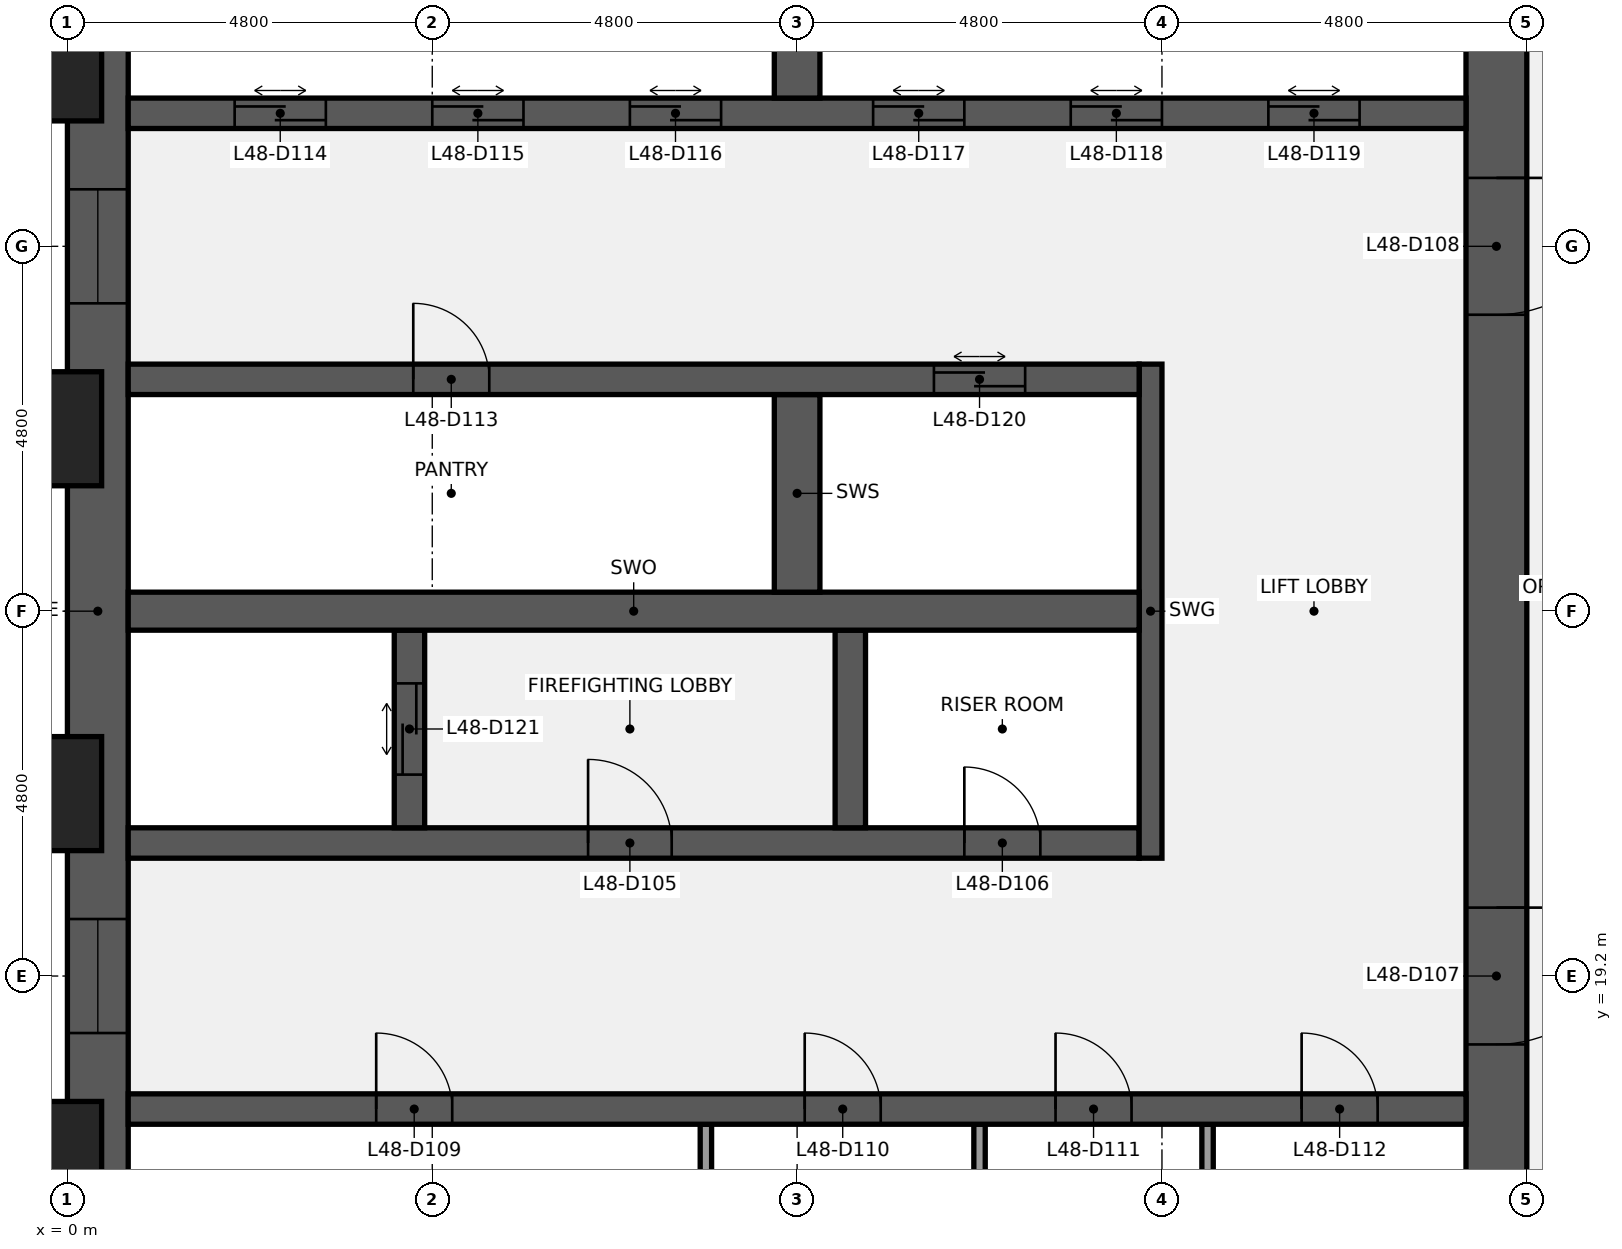
"""IFC4 building model, lengths in metres.
Left out: names, types, materials, properties, quantities, classifications, styles, units other than length and angle.
Written with IfcOpenShell. Run it as: python <this file> out.ifc"""

import sys

from ifc_helpers import new_model, si_unit, direction, frame, frame_2d, origin, origin_2d, place, context, subcontext, project, spatial, rectangle, extrude, element, fill, save


model = new_model("IFC4")
c1 = context("Model", 3, precision=1e-05, world=origin(), true_north=direction((0.0, 1.0)))
c2 = subcontext(c1, "Body", "Model", "MODEL_VIEW")
j1 = project(units=[si_unit("LENGTHUNIT", "METRE"), si_unit("PLANEANGLEUNIT", "RADIAN")], contexts=[c1])
p1 = place(None, origin())
s1 = spatial("IfcSite", under=j1, at=p1, CompositionType="ELEMENT")
p2 = place(p1, origin())
s2 = spatial("IfcBuilding", under=s1, at=p2, CompositionType="ELEMENT")
p3 = place(p2, frame((0.0, 0.0, 221.2)))
s3 = spatial("IfcBuildingStorey", under=s2, at=p3, CompositionType="ELEMENT", Elevation=221.2)
p4 = place(p3, frame((0.4, 9.6, 0.0), z_axis=(0.0, 0.0, 1.0), x_axis=(0.0, 1.0, 0.0)))
e1 = element("IfcWall", 1, at=p4, inside=s3, PredefinedType="SHEAR", context=c2, shape_type="SweptSolid", body=[
    extrude(rectangle(XDim=28.8, YDim=0.8, at=frame_2d((14.4, 0.0))), origin(), (0.0, 0.0, 1.0), 3.84),
])
p5 = place(p4, frame((8.85, 0.0, 0.9)))
e2 = element("IfcOpeningElement", 2, at=p5, cuts=e1, PredefinedType="OPENING", context=c2, shape_type="SweptSolid", body=[
    extrude(rectangle(XDim=1.5, YDim=1.5, at=frame_2d((0.75, 0.75))), frame((0.0, 0.41, 0.0), z_axis=(0.0, -1.0, 0.0), x_axis=(1.0, 0.0, 0.0)), (0.0, 0.0, 1.0), 0.82),
])
p6 = place(p4, frame((18.45, 0.0, 0.9)))
e3 = element("IfcOpeningElement", 3, at=p6, cuts=e1, PredefinedType="OPENING", context=c2, shape_type="SweptSolid", body=[
    extrude(rectangle(XDim=1.5, YDim=1.5, at=frame_2d((0.75, 0.75))), frame((0.0, 0.41, 0.0), z_axis=(0.0, -1.0, 0.0), x_axis=(1.0, 0.0, 0.0)), (0.0, 0.0, 1.0), 0.82),
])
p7 = place(p3, frame((18.8, 38.4, 0.0), z_axis=(0.0, 0.0, 1.0), x_axis=(0.0, -1.0, 0.0)))
e4 = element("IfcWall", 4, at=p7, inside=s3, PredefinedType="SHEAR", context=c2, shape_type="SweptSolid", body=[
    extrude(rectangle(XDim=28.8, YDim=0.8, at=frame_2d((14.4, 0.0))), origin(), (0.0, 0.0, 1.0), 3.84),
])
p8 = place(p7, frame((18.3, 0.0, 0.0)))
e5 = element("IfcOpeningElement", 5, at=p8, cuts=e4, PredefinedType="OPENING", context=c2, shape_type="SweptSolid", body=[
    extrude(rectangle(XDim=1.8, YDim=2.1, at=frame_2d((0.9, 1.05))), frame((0.0, 0.41, 0.0), z_axis=(0.0, -1.0, 0.0), x_axis=(1.0, 0.0, 0.0)), (0.0, 0.0, 1.0), 0.82),
])
p9 = place(p7, frame((8.7, 0.0, 0.0)))
e6 = element("IfcOpeningElement", 6, at=p9, cuts=e4, PredefinedType="OPENING", context=c2, shape_type="SweptSolid", body=[
    extrude(rectangle(XDim=1.8, YDim=2.1, at=frame_2d((0.9, 1.05))), frame((0.0, 0.41, 0.0), z_axis=(0.0, -1.0, 0.0), x_axis=(1.0, 0.0, 0.0)), (0.0, 0.0, 1.0), 0.82),
])
for number, where, z_axis, x_axis in (
    (7, (8.4, 14.65, 0.0), (0.0, 0.0, 1.0), (0.0, 1.0, 0.0)),
    (8, (12.0, 14.65, 0.0), (0.0, 0.0, 1.0), (0.0, 1.0, 0.0)),
    (9, (15.0, 14.65, 0.0), (0.0, 0.0, 1.0), (0.0, 1.0, 0.0)),
):
    element("IfcWall", number, at=place(p3, frame(where, z_axis=z_axis, x_axis=x_axis)), inside=s3, PredefinedType="PARTITIONING", context=c2, shape_type="SweptSolid", body=[
        extrude(rectangle(XDim=2.6, YDim=0.15, at=frame_2d((1.3, 0.0))), origin(), (0.0, 0.0, 1.0), 3.84),
    ])
p10 = place(p3, frame((0.8, 17.45, 0.0), z_axis=(0.0, 0.0, 1.0), x_axis=(1.0, 0.0, 0.0)))
e10 = element("IfcWall", 10, at=p10, inside=s3, PredefinedType="SHEAR", context=c2, shape_type="SweptSolid", body=[
    extrude(rectangle(XDim=17.6, YDim=0.4, at=frame_2d((8.8, 0.0))), origin(), (0.0, 0.0, 1.0), 3.84),
])
p11 = place(p10, frame((3.262, 0.0, 0.0)))
e11 = element("IfcOpeningElement", 11, at=p11, cuts=e10, PredefinedType="OPENING", context=c2, shape_type="SweptSolid", body=[
    extrude(rectangle(XDim=1.0, YDim=2.1, at=frame_2d((0.5, 1.05))), frame((0.0, 0.21, 0.0), z_axis=(0.0, -1.0, 0.0), x_axis=(1.0, 0.0, 0.0)), (0.0, 0.0, 1.0), 0.42),
])
p12 = place(p10, frame((8.9, 0.0, 0.0)))
e12 = element("IfcOpeningElement", 12, at=p12, cuts=e10, PredefinedType="OPENING", context=c2, shape_type="SweptSolid", body=[
    extrude(rectangle(XDim=1.0, YDim=2.1, at=frame_2d((0.5, 1.05))), frame((0.0, 0.21, 0.0), z_axis=(0.0, -1.0, 0.0), x_axis=(1.0, 0.0, 0.0)), (0.0, 0.0, 1.0), 0.42),
])
p13 = place(p10, frame((12.2, 0.0, 0.0)))
e13 = element("IfcOpeningElement", 13, at=p13, cuts=e10, PredefinedType="OPENING", context=c2, shape_type="SweptSolid", body=[
    extrude(rectangle(XDim=1.0, YDim=2.1, at=frame_2d((0.5, 1.05))), frame((0.0, 0.21, 0.0), z_axis=(0.0, -1.0, 0.0), x_axis=(1.0, 0.0, 0.0)), (0.0, 0.0, 1.0), 0.42),
])
p14 = place(p10, frame((15.438, 0.0, 0.0)))
e14 = element("IfcOpeningElement", 14, at=p14, cuts=e10, PredefinedType="OPENING", context=c2, shape_type="SweptSolid", body=[
    extrude(rectangle(XDim=1.0, YDim=2.1, at=frame_2d((0.5, 1.05))), frame((0.0, 0.21, 0.0), z_axis=(0.0, -1.0, 0.0), x_axis=(1.0, 0.0, 0.0)), (0.0, 0.0, 1.0), 0.42),
])
p15 = place(p3, frame((0.8, 20.95, 0.0), z_axis=(0.0, 0.0, 1.0), x_axis=(1.0, 0.0, 0.0)))
e15 = element("IfcWall", 15, at=p15, inside=s3, PredefinedType="SHEAR", context=c2, shape_type="SweptSolid", body=[
    extrude(rectangle(XDim=13.3, YDim=0.4, at=frame_2d((6.65, 0.0))), origin(), (0.0, 0.0, 1.0), 3.84),
])
p16 = place(p15, frame((6.05, 0.0, 0.0)))
e16 = element("IfcOpeningElement", 16, at=p16, cuts=e15, PredefinedType="OPENING", context=c2, shape_type="SweptSolid", body=[
    extrude(rectangle(XDim=1.1, YDim=2.1, at=frame_2d((0.55, 1.05))), frame((0.0, 0.21, 0.0), z_axis=(0.0, -1.0, 0.0), x_axis=(1.0, 0.0, 0.0)), (0.0, 0.0, 1.0), 0.42),
])
p17 = place(p15, frame((11.0, 0.0, 0.0)))
e17 = element("IfcOpeningElement", 17, at=p17, cuts=e15, PredefinedType="OPENING", context=c2, shape_type="SweptSolid", body=[
    extrude(rectangle(XDim=1.0, YDim=2.1, at=frame_2d((0.5, 1.05))), frame((0.0, 0.21, 0.0), z_axis=(0.0, -1.0, 0.0), x_axis=(1.0, 0.0, 0.0)), (0.0, 0.0, 1.0), 0.42),
])
p18 = place(p3, frame((14.25, 20.75, 0.0), z_axis=(0.0, 0.0, 1.0), x_axis=(0.0, 1.0, 0.0)))
e18 = element("IfcWall", 18, at=p18, inside=s3, PredefinedType="SHEAR", context=c2, shape_type="SweptSolid", body=[
    extrude(rectangle(XDim=6.5, YDim=0.3, at=frame_2d((3.25, 0.0))), origin(), (0.0, 0.0, 1.0), 3.84),
])
p19 = place(p3, frame((4.5, 21.15, 0.0), z_axis=(0.0, 0.0, 1.0), x_axis=(0.0, 1.0, 0.0)))
e19 = element("IfcWall", 19, at=p19, inside=s3, PredefinedType="SHEAR", context=c2, shape_type="SweptSolid", body=[
    extrude(rectangle(XDim=2.6, YDim=0.4, at=frame_2d((1.3, 0.0))), origin(), (0.0, 0.0, 1.0), 3.84),
])
p20 = place(p19, frame((0.7, 0.0, 0.0)))
e20 = element("IfcOpeningElement", 20, at=p20, cuts=e19, PredefinedType="OPENING", context=c2, shape_type="SweptSolid", body=[
    extrude(rectangle(XDim=1.2, YDim=2.1, at=frame_2d((0.6, 1.05))), frame((0.0, 0.21, 0.0), z_axis=(0.0, -1.0, 0.0), x_axis=(1.0, 0.0, 0.0)), (0.0, 0.0, 1.0), 0.42),
])
p21 = place(p3, frame((10.3, 21.15, 0.0), z_axis=(0.0, 0.0, 1.0), x_axis=(0.0, 1.0, 0.0)))
e21 = element("IfcWall", 21, at=p21, inside=s3, PredefinedType="SHEAR", context=c2, shape_type="SweptSolid", body=[
    extrude(rectangle(XDim=2.6, YDim=0.4, at=frame_2d((1.3, 0.0))), origin(), (0.0, 0.0, 1.0), 3.84),
])
p22 = place(p3, frame((0.8, 24.0, 0.0), z_axis=(0.0, 0.0, 1.0), x_axis=(1.0, 0.0, 0.0)))
e22 = element("IfcWall", 22, at=p22, inside=s3, PredefinedType="SHEAR", context=c2, shape_type="SweptSolid", body=[
    extrude(rectangle(XDim=13.3, YDim=0.5, at=frame_2d((6.65, 0.0))), origin(), (0.0, 0.0, 1.0), 3.84),
])
p23 = place(p3, frame((9.6, 24.25, 0.0), z_axis=(0.0, 0.0, 1.0), x_axis=(0.0, 1.0, 0.0)))
e23 = element("IfcWall", 23, at=p23, inside=s3, PredefinedType="SHEAR", context=c2, shape_type="SweptSolid", body=[
    extrude(rectangle(XDim=2.6, YDim=0.6, at=frame_2d((1.3, 0.0))), origin(), (0.0, 0.0, 1.0), 3.84),
])
p24 = place(p3, frame((0.8, 27.05, 0.0), z_axis=(0.0, 0.0, 1.0), x_axis=(1.0, 0.0, 0.0)))
e24 = element("IfcWall", 24, at=p24, inside=s3, PredefinedType="SHEAR", context=c2, shape_type="SweptSolid", body=[
    extrude(rectangle(XDim=13.3, YDim=0.4, at=frame_2d((6.65, 0.0))), origin(), (0.0, 0.0, 1.0), 3.84),
])
p25 = place(p24, frame((3.75, 0.0, 0.0)))
e25 = element("IfcOpeningElement", 25, at=p25, cuts=e24, PredefinedType="OPENING", context=c2, shape_type="SweptSolid", body=[
    extrude(rectangle(XDim=1.0, YDim=2.1, at=frame_2d((0.5, 1.05))), frame((0.0, 0.21, 0.0), z_axis=(0.0, -1.0, 0.0), x_axis=(1.0, 0.0, 0.0)), (0.0, 0.0, 1.0), 0.42),
])
p26 = place(p24, frame((10.6, 0.0, 0.0)))
e26 = element("IfcOpeningElement", 26, at=p26, cuts=e24, PredefinedType="OPENING", context=c2, shape_type="SweptSolid", body=[
    extrude(rectangle(XDim=1.2, YDim=2.1, at=frame_2d((0.6, 1.05))), frame((0.0, 0.21, 0.0), z_axis=(0.0, -1.0, 0.0), x_axis=(1.0, 0.0, 0.0)), (0.0, 0.0, 1.0), 0.42),
])
p27 = place(p3, frame((0.8, 30.55, 0.0), z_axis=(0.0, 0.0, 1.0), x_axis=(1.0, 0.0, 0.0)))
e27 = element("IfcWall", 27, at=p27, inside=s3, PredefinedType="SHEAR", context=c2, shape_type="SweptSolid", body=[
    extrude(rectangle(XDim=17.6, YDim=0.4, at=frame_2d((8.8, 0.0))), origin(), (0.0, 0.0, 1.0), 3.84),
])
p28 = place(p27, frame((1.4, 0.0, 0.0)))
e28 = element("IfcOpeningElement", 28, at=p28, cuts=e27, PredefinedType="OPENING", context=c2, shape_type="SweptSolid", body=[
    extrude(rectangle(XDim=1.2, YDim=2.1, at=frame_2d((0.6, 1.05))), frame((0.0, 0.21, 0.0), z_axis=(0.0, -1.0, 0.0), x_axis=(1.0, 0.0, 0.0)), (0.0, 0.0, 1.0), 0.42),
])
p29 = place(p27, frame((4.0, 0.0, 0.0)))
e29 = element("IfcOpeningElement", 29, at=p29, cuts=e27, PredefinedType="OPENING", context=c2, shape_type="SweptSolid", body=[
    extrude(rectangle(XDim=1.2, YDim=2.1, at=frame_2d((0.6, 1.05))), frame((0.0, 0.21, 0.0), z_axis=(0.0, -1.0, 0.0), x_axis=(1.0, 0.0, 0.0)), (0.0, 0.0, 1.0), 0.42),
])
p30 = place(p27, frame((6.6, 0.0, 0.0)))
e30 = element("IfcOpeningElement", 30, at=p30, cuts=e27, PredefinedType="OPENING", context=c2, shape_type="SweptSolid", body=[
    extrude(rectangle(XDim=1.2, YDim=2.1, at=frame_2d((0.6, 1.05))), frame((0.0, 0.21, 0.0), z_axis=(0.0, -1.0, 0.0), x_axis=(1.0, 0.0, 0.0)), (0.0, 0.0, 1.0), 0.42),
])
p31 = place(p27, frame((9.8, 0.0, 0.0)))
e31 = element("IfcOpeningElement", 31, at=p31, cuts=e27, PredefinedType="OPENING", context=c2, shape_type="SweptSolid", body=[
    extrude(rectangle(XDim=1.2, YDim=2.1, at=frame_2d((0.6, 1.05))), frame((0.0, 0.21, 0.0), z_axis=(0.0, -1.0, 0.0), x_axis=(1.0, 0.0, 0.0)), (0.0, 0.0, 1.0), 0.42),
])
p32 = place(p27, frame((12.4, 0.0, 0.0)))
e32 = element("IfcOpeningElement", 32, at=p32, cuts=e27, PredefinedType="OPENING", context=c2, shape_type="SweptSolid", body=[
    extrude(rectangle(XDim=1.2, YDim=2.1, at=frame_2d((0.6, 1.05))), frame((0.0, 0.21, 0.0), z_axis=(0.0, -1.0, 0.0), x_axis=(1.0, 0.0, 0.0)), (0.0, 0.0, 1.0), 0.42),
])
p33 = place(p27, frame((15.0, 0.0, 0.0)))
e33 = element("IfcOpeningElement", 33, at=p33, cuts=e27, PredefinedType="OPENING", context=c2, shape_type="SweptSolid", body=[
    extrude(rectangle(XDim=1.2, YDim=2.1, at=frame_2d((0.6, 1.05))), frame((0.0, 0.21, 0.0), z_axis=(0.0, -1.0, 0.0), x_axis=(1.0, 0.0, 0.0)), (0.0, 0.0, 1.0), 0.42),
])
p34 = place(p3, frame((9.6, 30.75, 0.0), z_axis=(0.0, 0.0, 1.0), x_axis=(0.0, 1.0, 0.0)))
e34 = element("IfcWall", 34, at=p34, inside=s3, PredefinedType="SHEAR", context=c2, shape_type="SweptSolid", body=[
    extrude(rectangle(XDim=2.6, YDim=0.6, at=frame_2d((1.3, 0.0))), origin(), (0.0, 0.0, 1.0), 3.84),
])
for number, where, z_axis, x_axis in (
    (35, (-0.75, 16.8, 0.0), (0.0, 0.0, 1.0), (0.0, 1.0, 0.0)),
    (36, (-0.75, 21.6, 0.0), (0.0, 0.0, 1.0), (0.0, 1.0, 0.0)),
    (37, (-0.75, 26.4, 0.0), (0.0, 0.0, 1.0), (0.0, 1.0, 0.0)),
    (38, (-0.75, 31.2, 0.0), (0.0, 0.0, 1.0), (0.0, 1.0, 0.0)),
):
    element("IfcColumn", number, at=place(p3, frame(where, z_axis=z_axis, x_axis=x_axis)), inside=s3, PredefinedType="PILASTER", context=c2, shape_type="SweptSolid", body=[
        extrude(rectangle(XDim=2.4, YDim=1.5, at=origin_2d()), origin(), (0.0, 0.0, 1.0), 4.0),
    ])
p35 = place(p16, origin())
e39 = element("IfcDoor", 39, at=p35, inside=s3, OperationType="SINGLE_SWING_LEFT", PredefinedType="DOOR", context=c2, shape_type="SweptSolid", body=[
    extrude(rectangle(XDim=1.1, YDim=2.1, at=frame_2d((0.55, 1.05))), frame((0.0, 0.025, 0.0), z_axis=(0.0, -1.0, 0.0), x_axis=(1.0, 0.0, 0.0)), (0.0, 0.0, 1.0), 0.05),
])
fill(e16, e39)
p36 = place(p17, origin())
e40 = element("IfcDoor", 40, at=p36, inside=s3, OperationType="SINGLE_SWING_LEFT", PredefinedType="DOOR", context=c2, shape_type="SweptSolid", body=[
    extrude(rectangle(XDim=1.0, YDim=2.1, at=frame_2d((0.5, 1.05))), frame((0.0, 0.025, 0.0), z_axis=(0.0, -1.0, 0.0), x_axis=(1.0, 0.0, 0.0)), (0.0, 0.0, 1.0), 0.05),
])
fill(e17, e40)
p37 = place(p8, origin())
e41 = element("IfcDoor", 41, at=p37, inside=s3, OperationType="DOUBLE_DOOR_SINGLE_SWING", PredefinedType="DOOR", context=c2, shape_type="SweptSolid", body=[
    extrude(rectangle(XDim=1.8, YDim=2.1, at=frame_2d((0.9, 1.05))), frame((0.0, 0.025, 0.0), z_axis=(0.0, -1.0, 0.0), x_axis=(1.0, 0.0, 0.0)), (0.0, 0.0, 1.0), 0.05),
])
fill(e5, e41)
p38 = place(p9, origin())
e42 = element("IfcDoor", 42, at=p38, inside=s3, OperationType="DOUBLE_DOOR_SINGLE_SWING", PredefinedType="DOOR", context=c2, shape_type="SweptSolid", body=[
    extrude(rectangle(XDim=1.8, YDim=2.1, at=frame_2d((0.9, 1.05))), frame((0.0, 0.025, 0.0), z_axis=(0.0, -1.0, 0.0), x_axis=(1.0, 0.0, 0.0)), (0.0, 0.0, 1.0), 0.05),
])
fill(e6, e42)
p39 = place(p11, origin())
e43 = element("IfcDoor", 43, at=p39, inside=s3, OperationType="SINGLE_SWING_LEFT", PredefinedType="DOOR", context=c2, shape_type="SweptSolid", body=[
    extrude(rectangle(XDim=1.0, YDim=2.1, at=frame_2d((0.5, 1.05))), frame((0.0, 0.025, 0.0), z_axis=(0.0, -1.0, 0.0), x_axis=(1.0, 0.0, 0.0)), (0.0, 0.0, 1.0), 0.05),
])
fill(e11, e43)
p40 = place(p12, origin())
e44 = element("IfcDoor", 44, at=p40, inside=s3, OperationType="SINGLE_SWING_LEFT", PredefinedType="DOOR", context=c2, shape_type="SweptSolid", body=[
    extrude(rectangle(XDim=1.0, YDim=2.1, at=frame_2d((0.5, 1.05))), frame((0.0, 0.025, 0.0), z_axis=(0.0, -1.0, 0.0), x_axis=(1.0, 0.0, 0.0)), (0.0, 0.0, 1.0), 0.05),
])
fill(e12, e44)
p41 = place(p13, origin())
e45 = element("IfcDoor", 45, at=p41, inside=s3, OperationType="SINGLE_SWING_LEFT", PredefinedType="DOOR", context=c2, shape_type="SweptSolid", body=[
    extrude(rectangle(XDim=1.0, YDim=2.1, at=frame_2d((0.5, 1.05))), frame((0.0, 0.025, 0.0), z_axis=(0.0, -1.0, 0.0), x_axis=(1.0, 0.0, 0.0)), (0.0, 0.0, 1.0), 0.05),
])
fill(e13, e45)
p42 = place(p14, origin())
e46 = element("IfcDoor", 46, at=p42, inside=s3, OperationType="SINGLE_SWING_LEFT", PredefinedType="DOOR", context=c2, shape_type="SweptSolid", body=[
    extrude(rectangle(XDim=1.0, YDim=2.1, at=frame_2d((0.5, 1.05))), frame((0.0, 0.025, 0.0), z_axis=(0.0, -1.0, 0.0), x_axis=(1.0, 0.0, 0.0)), (0.0, 0.0, 1.0), 0.05),
])
fill(e14, e46)
p43 = place(p25, origin())
e47 = element("IfcDoor", 47, at=p43, inside=s3, OperationType="SINGLE_SWING_LEFT", PredefinedType="DOOR", context=c2, shape_type="SweptSolid", body=[
    extrude(rectangle(XDim=1.0, YDim=2.1, at=frame_2d((0.5, 1.05))), frame((0.0, 0.025, 0.0), z_axis=(0.0, -1.0, 0.0), x_axis=(1.0, 0.0, 0.0)), (0.0, 0.0, 1.0), 0.05),
])
fill(e25, e47)
p44 = place(p28, origin())
e48 = element("IfcDoor", 48, at=p44, inside=s3, OperationType="DOUBLE_DOOR_SLIDING", PredefinedType="DOOR", context=c2, shape_type="SweptSolid", body=[
    extrude(rectangle(XDim=1.2, YDim=2.1, at=frame_2d((0.6, 1.05))), frame((0.0, 0.025, 0.0), z_axis=(0.0, -1.0, 0.0), x_axis=(1.0, 0.0, 0.0)), (0.0, 0.0, 1.0), 0.05),
])
fill(e28, e48)
p45 = place(p29, origin())
e49 = element("IfcDoor", 49, at=p45, inside=s3, OperationType="DOUBLE_DOOR_SLIDING", PredefinedType="DOOR", context=c2, shape_type="SweptSolid", body=[
    extrude(rectangle(XDim=1.2, YDim=2.1, at=frame_2d((0.6, 1.05))), frame((0.0, 0.025, 0.0), z_axis=(0.0, -1.0, 0.0), x_axis=(1.0, 0.0, 0.0)), (0.0, 0.0, 1.0), 0.05),
])
fill(e29, e49)
p46 = place(p30, origin())
e50 = element("IfcDoor", 50, at=p46, inside=s3, OperationType="DOUBLE_DOOR_SLIDING", PredefinedType="DOOR", context=c2, shape_type="SweptSolid", body=[
    extrude(rectangle(XDim=1.2, YDim=2.1, at=frame_2d((0.6, 1.05))), frame((0.0, 0.025, 0.0), z_axis=(0.0, -1.0, 0.0), x_axis=(1.0, 0.0, 0.0)), (0.0, 0.0, 1.0), 0.05),
])
fill(e30, e50)
p47 = place(p31, origin())
e51 = element("IfcDoor", 51, at=p47, inside=s3, OperationType="DOUBLE_DOOR_SLIDING", PredefinedType="DOOR", context=c2, shape_type="SweptSolid", body=[
    extrude(rectangle(XDim=1.2, YDim=2.1, at=frame_2d((0.6, 1.05))), frame((0.0, 0.025, 0.0), z_axis=(0.0, -1.0, 0.0), x_axis=(1.0, 0.0, 0.0)), (0.0, 0.0, 1.0), 0.05),
])
fill(e31, e51)
p48 = place(p32, origin())
e52 = element("IfcDoor", 52, at=p48, inside=s3, OperationType="DOUBLE_DOOR_SLIDING", PredefinedType="DOOR", context=c2, shape_type="SweptSolid", body=[
    extrude(rectangle(XDim=1.2, YDim=2.1, at=frame_2d((0.6, 1.05))), frame((0.0, 0.025, 0.0), z_axis=(0.0, -1.0, 0.0), x_axis=(1.0, 0.0, 0.0)), (0.0, 0.0, 1.0), 0.05),
])
fill(e32, e52)
p49 = place(p33, origin())
e53 = element("IfcDoor", 53, at=p49, inside=s3, OperationType="DOUBLE_DOOR_SLIDING", PredefinedType="DOOR", context=c2, shape_type="SweptSolid", body=[
    extrude(rectangle(XDim=1.2, YDim=2.1, at=frame_2d((0.6, 1.05))), frame((0.0, 0.025, 0.0), z_axis=(0.0, -1.0, 0.0), x_axis=(1.0, 0.0, 0.0)), (0.0, 0.0, 1.0), 0.05),
])
fill(e33, e53)
p50 = place(p26, origin())
e54 = element("IfcDoor", 54, at=p50, inside=s3, OperationType="DOUBLE_DOOR_SLIDING", PredefinedType="DOOR", context=c2, shape_type="SweptSolid", body=[
    extrude(rectangle(XDim=1.2, YDim=2.1, at=frame_2d((0.6, 1.05))), frame((0.0, 0.025, 0.0), z_axis=(0.0, -1.0, 0.0), x_axis=(1.0, 0.0, 0.0)), (0.0, 0.0, 1.0), 0.05),
])
fill(e26, e54)
p51 = place(p20, origin())
e55 = element("IfcDoor", 55, at=p51, inside=s3, OperationType="DOUBLE_DOOR_SLIDING", PredefinedType="DOOR", context=c2, shape_type="SweptSolid", body=[
    extrude(rectangle(XDim=1.2, YDim=2.1, at=frame_2d((0.6, 1.05))), frame((0.0, 0.025, 0.0), z_axis=(0.0, -1.0, 0.0), x_axis=(1.0, 0.0, 0.0)), (0.0, 0.0, 1.0), 0.05),
])
fill(e20, e55)
p52 = place(p5, origin())
e56 = element("IfcWindow", 56, at=p52, inside=s3, PartitioningType="SINGLE_PANEL", PredefinedType="WINDOW", context=c2, shape_type="SweptSolid", body=[
    extrude(rectangle(XDim=1.5, YDim=1.5, at=frame_2d((0.75, 0.75))), frame((0.0, 0.03, 0.0), z_axis=(0.0, -1.0, 0.0), x_axis=(1.0, 0.0, 0.0)), (0.0, 0.0, 1.0), 0.06),
])
fill(e2, e56)
p53 = place(p6, origin())
e57 = element("IfcWindow", 57, at=p53, inside=s3, PartitioningType="SINGLE_PANEL", PredefinedType="WINDOW", context=c2, shape_type="SweptSolid", body=[
    extrude(rectangle(XDim=1.5, YDim=1.5, at=frame_2d((0.75, 0.75))), frame((0.0, 0.03, 0.0), z_axis=(0.0, -1.0, 0.0), x_axis=(1.0, 0.0, 0.0)), (0.0, 0.0, 1.0), 0.06),
])
fill(e3, e57)
save(model, sys.argv[1])
